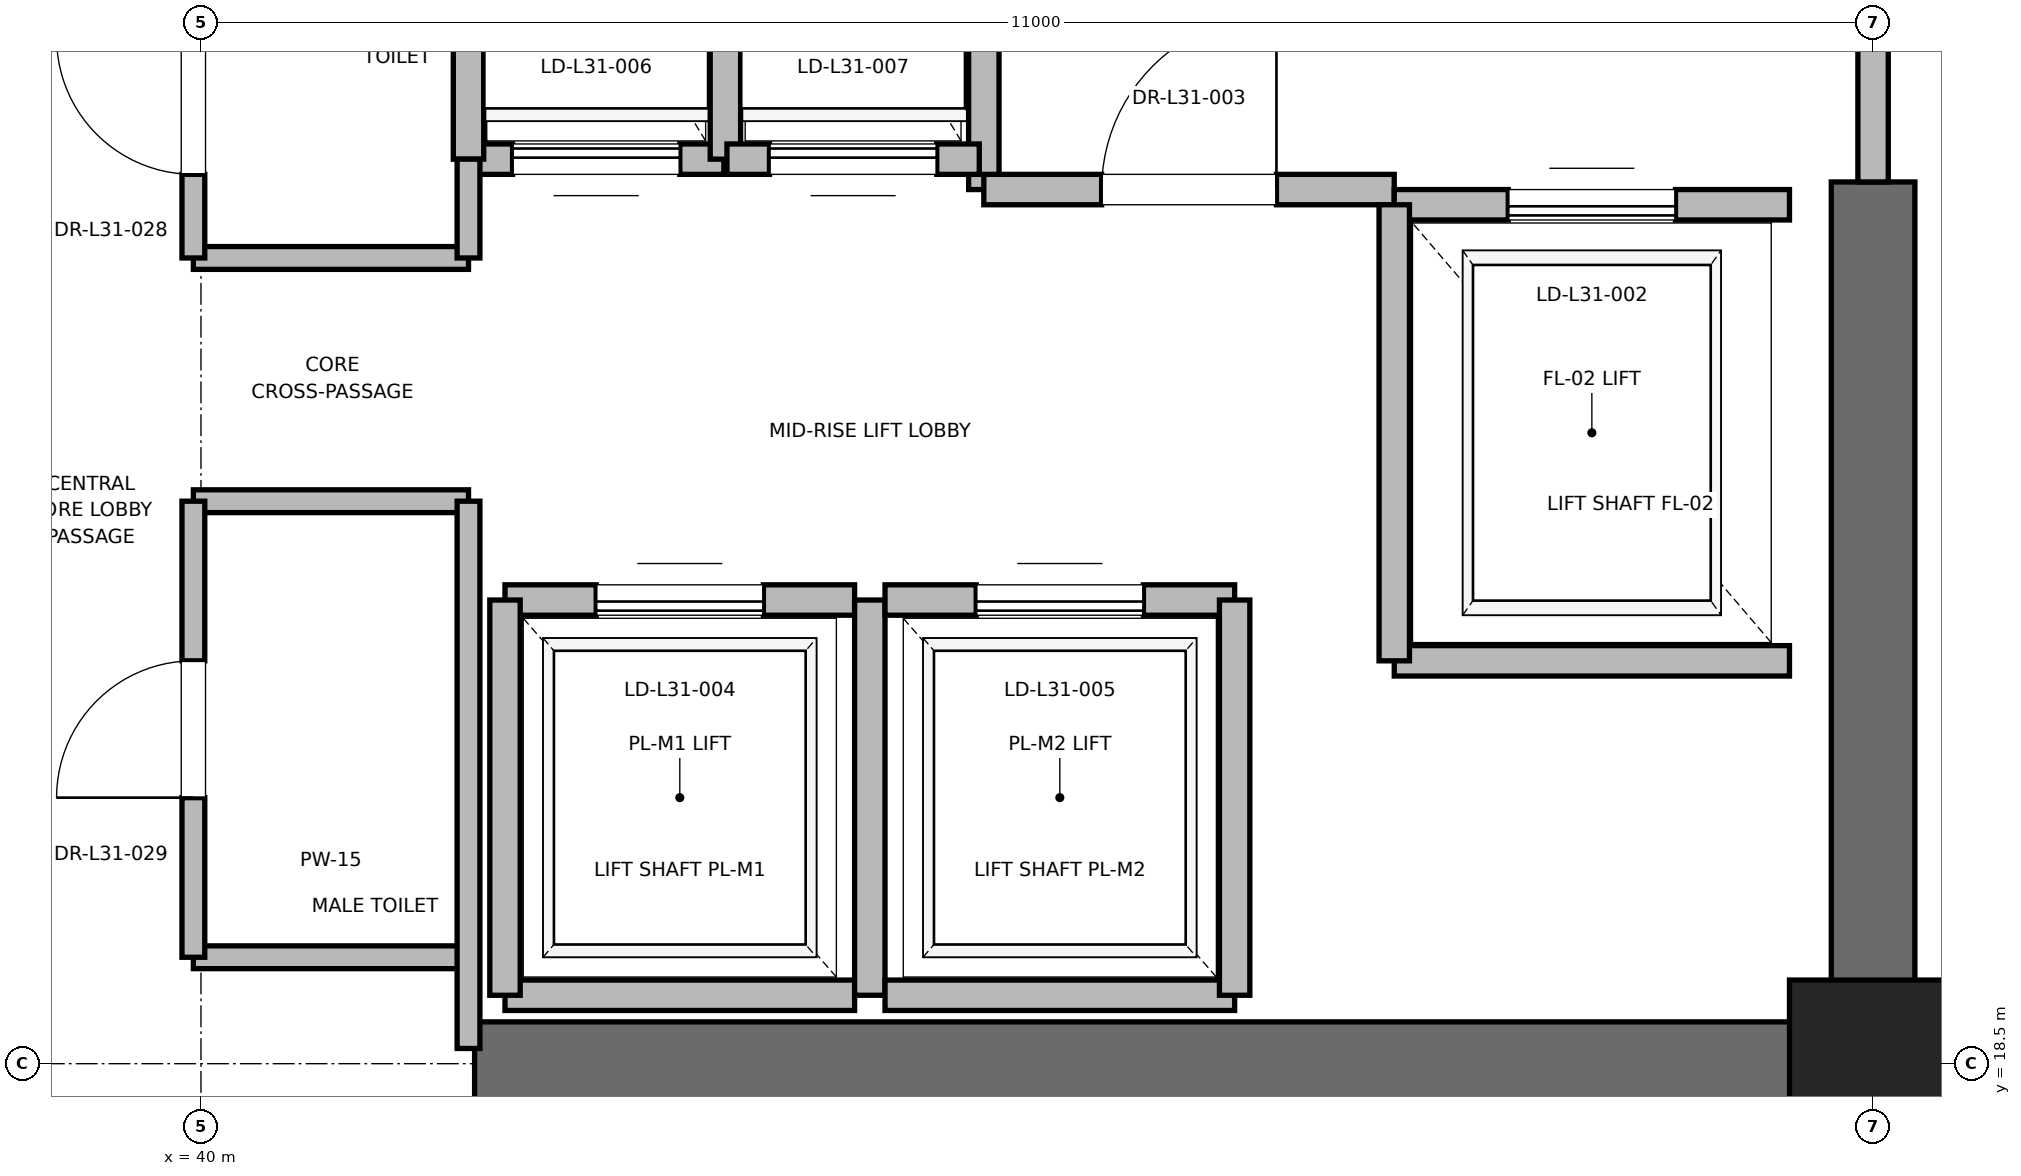
"""IFC4 building model, lengths in metres.
Left out: names, types, materials, properties, quantities, classifications, styles, units other than length and angle.
Written with IfcOpenShell. Run it as: python <this file> out.ifc"""

import sys

from ifc_helpers import new_model, si_unit, direction, frame, frame_2d, origin, origin_2d, place, context, subcontext, project, spatial, rectangle, extrude, element, fill, save


model = new_model("IFC4")
c1 = context("Model", 3, precision=1e-05, world=origin(), true_north=direction((0.0, 1.0)))
c2 = subcontext(c1, "Body", "Model", "MODEL_VIEW")
j1 = project(units=[si_unit("LENGTHUNIT", "METRE"), si_unit("PLANEANGLEUNIT", "RADIAN")], contexts=[c1])
p1 = place(None, origin())
s1 = spatial("IfcSite", under=j1, at=p1, CompositionType="ELEMENT")
p2 = place(p1, origin())
s2 = spatial("IfcBuilding", under=s1, at=p2, CompositionType="ELEMENT")
p3 = place(p2, frame((0.0, 0.0, 136.4)))
s3 = spatial("IfcBuildingStorey", under=s2, at=p3, CompositionType="ELEMENT", Elevation=136.4)
p4 = place(p3, frame((51.0, 18.5, 0.0), z_axis=(0.0, 0.0, 1.0), x_axis=(1.0, 0.0, 0.0)))
e1 = element("IfcColumn", 1, at=p4, inside=s3, PredefinedType="PILASTER", context=c2, shape_type="SweptSolid", body=[
    extrude(rectangle(XDim=1.1, YDim=1.1, at=origin_2d()), origin(), (0.0, 0.0, 1.0), 4.0),
])
p5 = place(p3, frame((41.8, 18.5, 0.0), z_axis=(0.0, 0.0, 1.0), x_axis=(1.0, 0.0, 0.0)))
e2 = element("IfcWall", 2, at=p5, inside=s3, PredefinedType="SHEAR", context=c2, shape_type="SweptSolid", body=[
    extrude(rectangle(XDim=9.2, YDim=0.55, at=frame_2d((4.6, 0.0))), origin(), (0.0, 0.0, 1.0), 3.775),
])
p6 = place(p3, frame((51.0, 18.5, 0.0), z_axis=(0.0, 0.0, 1.0), x_axis=(0.0, 1.0, 0.0)))
e3 = element("IfcWall", 3, at=p6, inside=s3, PredefinedType="SHEAR", context=c2, shape_type="SweptSolid", body=[
    extrude(rectangle(XDim=5.8, YDim=0.55, at=frame_2d((2.9, 0.0))), origin(), (0.0, 0.0, 1.0), 3.775),
])
p7 = place(p3, frame((45.15, 24.25, 0.0), z_axis=(0.0, 0.0, 1.0), x_axis=(0.0, 1.0, 0.0)))
e4 = element("IfcWall", 4, at=p7, inside=s3, PredefinedType="PARTITIONING", context=c2, shape_type="SweptSolid", body=[
    extrude(rectangle(XDim=3.37, YDim=0.2, at=frame_2d((1.685, 0.0))), origin(), (0.0, 0.0, 1.0), 3.775),
])
p8 = place(p3, frame((45.15, 24.25, 0.0), z_axis=(0.0, 0.0, 1.0), x_axis=(1.0, 0.0, 0.0)))
e5 = element("IfcWall", 5, at=p8, inside=s3, PredefinedType="PARTITIONING", context=c2, shape_type="SweptSolid", body=[
    extrude(rectangle(XDim=2.7, YDim=0.2, at=frame_2d((1.35, 0.0))), origin(), (0.0, 0.0, 1.0), 3.775),
])
p9 = place(p8, frame((0.775, 0.0, 0.0)))
e6 = element("IfcOpeningElement", 6, at=p9, cuts=e5, PredefinedType="OPENING", context=c2, shape_type="SweptSolid", body=[
    extrude(rectangle(XDim=1.15, YDim=2.2, at=frame_2d((0.575, 1.1))), frame((0.0, 0.1, 0.0), z_axis=(0.0, -1.0, 0.0), x_axis=(1.0, 0.0, 0.0)), (0.0, 0.0, 1.0), 0.2),
])
p10 = place(p3, frame((51.0, 24.3, 0.0), z_axis=(0.0, 0.0, 1.0), x_axis=(0.0, 1.0, 0.0)))
e7 = element("IfcWall", 7, at=p10, inside=s3, PredefinedType="PARTITIONING", context=c2, shape_type="SweptSolid", body=[
    extrude(rectangle(XDim=3.4, YDim=0.2, at=frame_2d((1.7, 0.0))), origin(), (0.0, 0.0, 1.0), 2.755),
])
p11 = place(p10, frame((1.125, 0.0, 0.0)))
e8 = element("IfcOpeningElement", 8, at=p11, cuts=e7, PredefinedType="OPENING", context=c2, shape_type="SweptSolid", body=[
    extrude(rectangle(XDim=1.15, YDim=2.2, at=frame_2d((0.575, 1.1))), frame((0.0, 0.1, 0.0), z_axis=(0.0, -1.0, 0.0), x_axis=(1.0, 0.0, 0.0)), (0.0, 0.0, 1.0), 0.2),
])
p12 = place(p3, frame((47.85, 21.15, 0.0), z_axis=(0.0, 0.0, 1.0), x_axis=(1.0, 0.0, 0.0)))
e9 = element("IfcWall", 9, at=p12, inside=s3, PredefinedType="SOLIDWALL", context=c2, shape_type="SweptSolid", body=[
    extrude(rectangle(XDim=2.6, YDim=0.2, at=frame_2d((1.3, 0.0))), origin(), (0.0, 0.0, 1.0), 3.775),
])
p13 = place(p3, frame((50.45, 24.15, 0.0), z_axis=(0.0, 0.0, 1.0), x_axis=(-1.0, 0.0, 0.0)))
e10 = element("IfcWall", 10, at=p13, inside=s3, PredefinedType="SOLIDWALL", context=c2, shape_type="SweptSolid", body=[
    extrude(rectangle(XDim=2.6, YDim=0.2, at=frame_2d((1.3, 0.0))), origin(), (0.0, 0.0, 1.0), 2.755),
])
p14 = place(p13, frame((0.75, 0.0, 0.0)))
e11 = element("IfcOpeningElement", 11, at=p14, cuts=e10, PredefinedType="OPENING", context=c2, shape_type="SweptSolid", body=[
    extrude(rectangle(XDim=1.1, YDim=2.2, at=frame_2d((0.55, 1.1))), frame((0.0, 0.1, 0.0), z_axis=(0.0, -1.0, 0.0), x_axis=(1.0, 0.0, 0.0)), (0.0, 0.0, 1.0), 0.2),
])
p15 = place(p3, frame((47.85, 24.15, 0.0), z_axis=(0.0, 0.0, 1.0), x_axis=(0.0, -1.0, 0.0)))
e12 = element("IfcWall", 12, at=p15, inside=s3, PredefinedType="SOLIDWALL", context=c2, shape_type="SweptSolid", body=[
    extrude(rectangle(XDim=3.0, YDim=0.2, at=frame_2d((1.5, 0.0))), origin(), (0.0, 0.0, 1.0), 3.775),
])
p16 = place(p3, frame((42.0, 18.95, 0.0), z_axis=(0.0, 0.0, 1.0), x_axis=(1.0, 0.0, 0.0)))
e13 = element("IfcWall", 13, at=p16, inside=s3, PredefinedType="SOLIDWALL", context=c2, shape_type="SweptSolid", body=[
    extrude(rectangle(XDim=2.3, YDim=0.2, at=frame_2d((1.15, 0.0))), origin(), (0.0, 0.0, 1.0), 2.755),
])
p17 = place(p3, frame((44.3, 21.55, 0.0), z_axis=(0.0, 0.0, 1.0), x_axis=(-1.0, 0.0, 0.0)))
e14 = element("IfcWall", 14, at=p17, inside=s3, PredefinedType="SOLIDWALL", context=c2, shape_type="SweptSolid", body=[
    extrude(rectangle(XDim=2.3, YDim=0.2, at=frame_2d((1.15, 0.0))), origin(), (0.0, 0.0, 1.0), 3.775),
])
p18 = place(p17, frame((0.6, 0.0, 0.0)))
e15 = element("IfcOpeningElement", 15, at=p18, cuts=e14, PredefinedType="OPENING", context=c2, shape_type="SweptSolid", body=[
    extrude(rectangle(XDim=1.1, YDim=2.2, at=frame_2d((0.55, 1.1))), frame((0.0, 0.1, 0.0), z_axis=(0.0, -1.0, 0.0), x_axis=(1.0, 0.0, 0.0)), (0.0, 0.0, 1.0), 0.2),
])
p19 = place(p3, frame((42.0, 21.55, 0.0), z_axis=(0.0, 0.0, 1.0), x_axis=(0.0, -1.0, 0.0)))
e16 = element("IfcWall", 16, at=p19, inside=s3, PredefinedType="SOLIDWALL", context=c2, shape_type="SweptSolid", body=[
    extrude(rectangle(XDim=2.6, YDim=0.2, at=frame_2d((1.3, 0.0))), origin(), (0.0, 0.0, 1.0), 2.755),
])
p20 = place(p3, frame((44.4, 18.95, 0.0), z_axis=(0.0, 0.0, 1.0), x_axis=(0.0, 1.0, 0.0)))
e17 = element("IfcWall", 17, at=p20, inside=s3, PredefinedType="SOLIDWALL", context=c2, shape_type="SweptSolid", body=[
    extrude(rectangle(XDim=2.6, YDim=0.2, at=frame_2d((1.3, 0.0))), origin(), (0.0, 0.0, 1.0), 3.775),
])
p21 = place(p3, frame((44.5, 18.95, 0.0), z_axis=(0.0, 0.0, 1.0), x_axis=(1.0, 0.0, 0.0)))
e18 = element("IfcWall", 18, at=p21, inside=s3, PredefinedType="SOLIDWALL", context=c2, shape_type="SweptSolid", body=[
    extrude(rectangle(XDim=2.3, YDim=0.2, at=frame_2d((1.15, 0.0))), origin(), (0.0, 0.0, 1.0), 3.775),
])
p22 = place(p3, frame((46.8, 21.55, 0.0), z_axis=(0.0, 0.0, 1.0), x_axis=(-1.0, 0.0, 0.0)))
e19 = element("IfcWall", 19, at=p22, inside=s3, PredefinedType="SOLIDWALL", context=c2, shape_type="SweptSolid", body=[
    extrude(rectangle(XDim=2.3, YDim=0.2, at=frame_2d((1.15, 0.0))), origin(), (0.0, 0.0, 1.0), 3.775),
])
p23 = place(p22, frame((0.6, 0.0, 0.0)))
e20 = element("IfcOpeningElement", 20, at=p23, cuts=e19, PredefinedType="OPENING", context=c2, shape_type="SweptSolid", body=[
    extrude(rectangle(XDim=1.1, YDim=2.2, at=frame_2d((0.55, 1.1))), frame((0.0, 0.1, 0.0), z_axis=(0.0, -1.0, 0.0), x_axis=(1.0, 0.0, 0.0)), (0.0, 0.0, 1.0), 0.2),
])
p24 = place(p3, frame((46.8, 18.95, 0.0), z_axis=(0.0, 0.0, 1.0), x_axis=(0.0, 1.0, 0.0)))
e21 = element("IfcWall", 21, at=p24, inside=s3, PredefinedType="SOLIDWALL", context=c2, shape_type="SweptSolid", body=[
    extrude(rectangle(XDim=2.6, YDim=0.2, at=frame_2d((1.3, 0.0))), origin(), (0.0, 0.0, 1.0), 3.775),
])
p25 = place(p3, frame((41.76, 24.45, 0.0), z_axis=(0.0, 0.0, 1.0), x_axis=(1.0, 0.0, 0.0)))
e22 = element("IfcWall", 22, at=p25, inside=s3, PredefinedType="SOLIDWALL", context=c2, shape_type="SweptSolid", body=[
    extrude(rectangle(XDim=1.68, YDim=0.2, at=frame_2d((0.84, 0.0))), origin(), (0.0, 0.0, 1.0), 3.775),
])
p26 = place(p25, frame((0.29, 0.0, 0.0)))
e23 = element("IfcOpeningElement", 23, at=p26, cuts=e22, PredefinedType="OPENING", context=c2, shape_type="SweptSolid", body=[
    extrude(rectangle(XDim=1.1, YDim=2.2, at=frame_2d((0.55, 1.1))), frame((0.0, 0.1, 0.0), z_axis=(0.0, -1.0, 0.0), x_axis=(1.0, 0.0, 0.0)), (0.0, 0.0, 1.0), 0.2),
])
for number, where, z_axis, x_axis in (
    (24, (41.76, 27.05, 0.0), (0.0, 0.0, 1.0), (0.0, -1.0, 0.0)),
    (25, (43.45, 24.45, 0.0), (0.0, 0.0, 1.0), (0.0, 1.0, 0.0)),
):
    element("IfcWall", number, at=place(p3, frame(where, z_axis=z_axis, x_axis=x_axis)), inside=s3, PredefinedType="SOLIDWALL", context=c2, shape_type="SweptSolid", body=[
        extrude(rectangle(XDim=2.6, YDim=0.2, at=frame_2d((1.3, 0.0))), origin(), (0.0, 0.0, 1.0), 3.775),
    ])
p27 = place(p3, frame((43.46, 24.45, 0.0), z_axis=(0.0, 0.0, 1.0), x_axis=(1.0, 0.0, 0.0)))
e26 = element("IfcWall", 26, at=p27, inside=s3, PredefinedType="SOLIDWALL", context=c2, shape_type="SweptSolid", body=[
    extrude(rectangle(XDim=1.66, YDim=0.2, at=frame_2d((0.83, 0.0))), origin(), (0.0, 0.0, 1.0), 3.775),
])
p28 = place(p27, frame((0.28, 0.0, 0.0)))
e27 = element("IfcOpeningElement", 27, at=p28, cuts=e26, PredefinedType="OPENING", context=c2, shape_type="SweptSolid", body=[
    extrude(rectangle(XDim=1.1, YDim=2.2, at=frame_2d((0.55, 1.1))), frame((0.0, 0.1, 0.0), z_axis=(0.0, -1.0, 0.0), x_axis=(1.0, 0.0, 0.0)), (0.0, 0.0, 1.0), 0.2),
])
for number, where, z_axis, x_axis in (
    (28, (39.95, 19.2, 0.0), (0.0, 0.0, 1.0), (1.0, 0.0, 0.0)),
    (29, (39.95, 22.2, 0.0), (0.0, 0.0, 1.0), (1.0, 0.0, 0.0)),
    (30, (39.95, 23.8, 0.0), (0.0, 0.0, 1.0), (1.0, 0.0, 0.0)),
):
    element("IfcWall", number, at=place(p3, frame(where, z_axis=z_axis, x_axis=x_axis)), inside=s3, PredefinedType="PARTITIONING", context=c2, shape_type="SweptSolid", body=[
        extrude(rectangle(XDim=1.81, YDim=0.15, at=frame_2d((0.905, 0.0))), origin(), (0.0, 0.0, 1.0), 2.85),
    ])
p29 = place(p3, frame((41.76, 18.6, 0.0), z_axis=(0.0, 0.0, 1.0), x_axis=(0.0, 1.0, 0.0)))
e31 = element("IfcWall", 31, at=p29, inside=s3, PredefinedType="PARTITIONING", context=c2, shape_type="SweptSolid", body=[
    extrude(rectangle(XDim=3.6, YDim=0.15, at=frame_2d((1.8, 0.0))), origin(), (0.0, 0.0, 1.0), 2.755),
])
p30 = place(p3, frame((41.76, 23.8, 0.0), z_axis=(0.0, 0.0, 1.0), x_axis=(0.0, 1.0, 0.0)))
e32 = element("IfcWall", 32, at=p30, inside=s3, PredefinedType="PARTITIONING", context=c2, shape_type="SweptSolid", body=[
    extrude(rectangle(XDim=0.65, YDim=0.15, at=frame_2d((0.325, 0.0))), origin(), (0.0, 0.0, 1.0), 2.85),
])
p31 = place(p3, frame((39.95, 19.2, 0.0), z_axis=(0.0, 0.0, 1.0), x_axis=(0.0, 1.0, 0.0)))
e33 = element("IfcWall", 33, at=p31, inside=s3, PredefinedType="PARTITIONING", context=c2, shape_type="SweptSolid", body=[
    extrude(rectangle(XDim=3.0, YDim=0.15, at=frame_2d((1.5, 0.0))), origin(), (0.0, 0.0, 1.0), 2.85),
])
p32 = place(p31, frame((1.05, 0.0, 0.0)))
e34 = element("IfcOpeningElement", 34, at=p32, cuts=e33, PredefinedType="OPENING", context=c2, shape_type="SweptSolid", body=[
    extrude(rectangle(XDim=0.9, YDim=2.1, at=frame_2d((0.45, 1.05))), frame((0.0, 0.075, 0.0), z_axis=(0.0, -1.0, 0.0), x_axis=(1.0, 0.0, 0.0)), (0.0, 0.0, 1.0), 0.15),
])
p33 = place(p3, frame((39.95, 23.8, 0.0), z_axis=(0.0, 0.0, 1.0), x_axis=(0.0, 1.0, 0.0)))
e35 = element("IfcWall", 35, at=p33, inside=s3, PredefinedType="PARTITIONING", context=c2, shape_type="SweptSolid", body=[
    extrude(rectangle(XDim=2.0, YDim=0.15, at=frame_2d((1.0, 0.0))), origin(), (0.0, 0.0, 1.0), 2.85),
])
p34 = place(p33, frame((0.55, 0.0, 0.0)))
e36 = element("IfcOpeningElement", 36, at=p34, cuts=e35, PredefinedType="OPENING", context=c2, shape_type="SweptSolid", body=[
    extrude(rectangle(XDim=0.9, YDim=2.1, at=frame_2d((0.45, 1.05))), frame((0.0, 0.075, 0.0), z_axis=(0.0, -1.0, 0.0), x_axis=(1.0, 0.0, 0.0)), (0.0, 0.0, 1.0), 0.15),
])
p35 = place(p9, origin())
e37 = element("IfcDoor", 37, at=p35, inside=s3, OperationType="SINGLE_SWING_RIGHT", PredefinedType="DOOR", context=c2, shape_type="SweptSolid", body=[
    extrude(rectangle(XDim=1.15, YDim=2.2, at=frame_2d((0.575, 1.1))), frame((0.0, 0.025, 0.0), z_axis=(0.0, -1.0, 0.0), x_axis=(1.0, 0.0, 0.0)), (0.0, 0.0, 1.0), 0.05),
])
fill(e6, e37)
p36 = place(p14, origin())
e38 = element("IfcDoor", 38, at=p36, inside=s3, OperationType="SLIDING_TO_RIGHT", PredefinedType="DOOR", context=c2, shape_type="SweptSolid", body=[
    extrude(rectangle(XDim=1.1, YDim=2.2, at=frame_2d((0.55, 1.1))), frame((0.0, 0.025, 0.0), z_axis=(0.0, -1.0, 0.0), x_axis=(1.0, 0.0, 0.0)), (0.0, 0.0, 1.0), 0.05),
])
fill(e11, e38)
p37 = place(p18, origin())
e39 = element("IfcDoor", 39, at=p37, inside=s3, OperationType="SLIDING_TO_RIGHT", PredefinedType="DOOR", context=c2, shape_type="SweptSolid", body=[
    extrude(rectangle(XDim=1.1, YDim=2.2, at=frame_2d((0.55, 1.1))), frame((0.0, 0.025, 0.0), z_axis=(0.0, -1.0, 0.0), x_axis=(1.0, 0.0, 0.0)), (0.0, 0.0, 1.0), 0.05),
])
fill(e15, e39)
p38 = place(p23, origin())
e40 = element("IfcDoor", 40, at=p38, inside=s3, OperationType="SLIDING_TO_RIGHT", PredefinedType="DOOR", context=c2, shape_type="SweptSolid", body=[
    extrude(rectangle(XDim=1.1, YDim=2.2, at=frame_2d((0.55, 1.1))), frame((0.0, 0.025, 0.0), z_axis=(0.0, -1.0, 0.0), x_axis=(1.0, 0.0, 0.0)), (0.0, 0.0, 1.0), 0.05),
])
fill(e20, e40)
p39 = place(p26, origin())
e41 = element("IfcDoor", 41, at=p39, inside=s3, OperationType="SLIDING_TO_RIGHT", PredefinedType="DOOR", context=c2, shape_type="SweptSolid", body=[
    extrude(rectangle(XDim=1.1, YDim=2.2, at=frame_2d((0.55, 1.1))), frame((0.0, 0.025, 0.0), z_axis=(0.0, -1.0, 0.0), x_axis=(1.0, 0.0, 0.0)), (0.0, 0.0, 1.0), 0.05),
])
fill(e23, e41)
p40 = place(p28, origin())
e42 = element("IfcDoor", 42, at=p40, inside=s3, OperationType="SLIDING_TO_RIGHT", PredefinedType="DOOR", context=c2, shape_type="SweptSolid", body=[
    extrude(rectangle(XDim=1.1, YDim=2.2, at=frame_2d((0.55, 1.1))), frame((0.0, 0.025, 0.0), z_axis=(0.0, -1.0, 0.0), x_axis=(1.0, 0.0, 0.0)), (0.0, 0.0, 1.0), 0.05),
])
fill(e27, e42)
p41 = place(p32, origin())
e43 = element("IfcDoor", 43, at=p41, inside=s3, OperationType="SINGLE_SWING_LEFT", PredefinedType="DOOR", context=c2, shape_type="SweptSolid", body=[
    extrude(rectangle(XDim=0.9, YDim=2.1, at=frame_2d((0.45, 1.05))), frame((0.0, 0.025, 0.0), z_axis=(0.0, -1.0, 0.0), x_axis=(1.0, 0.0, 0.0)), (0.0, 0.0, 1.0), 0.05),
])
fill(e34, e43)
p42 = place(p34, origin())
e44 = element("IfcDoor", 44, at=p42, inside=s3, OperationType="SINGLE_SWING_RIGHT", PredefinedType="DOOR", context=c2, shape_type="SweptSolid", body=[
    extrude(rectangle(XDim=0.9, YDim=2.1, at=frame_2d((0.45, 1.05))), frame((0.0, 0.025, 0.0), z_axis=(0.0, -1.0, 0.0), x_axis=(1.0, 0.0, 0.0)), (0.0, 0.0, 1.0), 0.05),
])
fill(e36, e44)
save(model, sys.argv[1])
